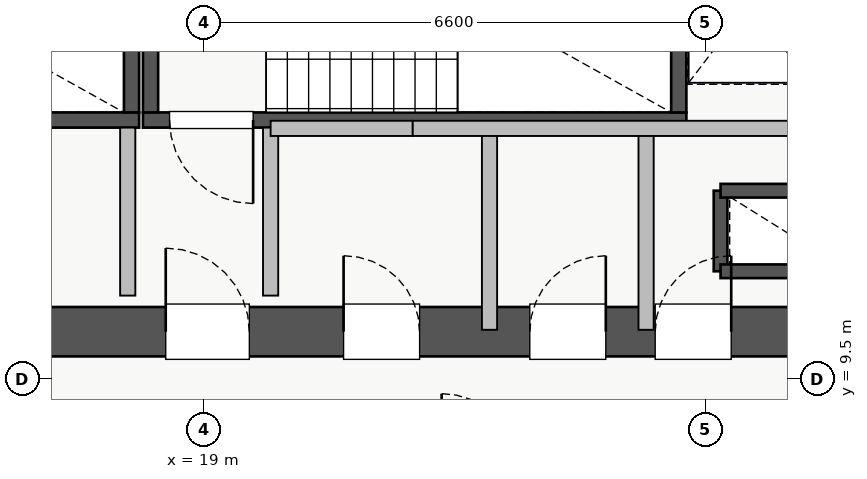
"""IFC4 building model, lengths in metres.
Left out: names, types, materials, properties, quantities, classifications, styles, units other than length and angle.
Written with IfcOpenShell. Run it as: python <this file> out.ifc"""

import sys

from ifc_helpers import new_model, si_unit, direction, frame, frame_2d, origin, place, context, subcontext, project, spatial, rectangle, extrude, source, transform, mapped, element, fill, save


model = new_model("IFC4")
c1 = context("Model", 3, precision=1e-05, world=origin(), true_north=direction((0.0, 1.0)))
c2 = subcontext(c1, "Body", "Model", "MODEL_VIEW")
j1 = project(units=[si_unit("LENGTHUNIT", "METRE"), si_unit("PLANEANGLEUNIT", "RADIAN")], contexts=[c1])
p1 = place(None, origin())
s1 = spatial("IfcSite", under=j1, at=p1, CompositionType="ELEMENT")
p2 = place(p1, origin())
s2 = spatial("IfcBuilding", under=s1, at=p2, CompositionType="ELEMENT")
p3 = place(p2, frame((0.0, 0.0, 179.5)))
s3 = spatial("IfcBuildingStorey", under=s2, at=p3, CompositionType="ELEMENT", Elevation=179.5)
p4 = place(p3, frame((25.8, 10.92, 0.0), z_axis=(0.0, 0.0, 1.0), x_axis=(0.0, 1.0, 0.0)))
e1 = element("IfcWall", 1, at=p4, inside=s3, PredefinedType="SHEAR", context=c2, shape_type="SweptSolid", body=[
    extrude(rectangle(XDim=1.06, YDim=0.18, at=frame_2d((0.53, 0.0))), origin(), (0.0, 0.0, 1.0), 3.07),
])
for number, where, z_axis, x_axis in (
    (2, (25.8, 11.98, 0.0), (0.0, 0.0, 1.0), (1.0, 0.0, 0.0)),
    (3, (25.8, 10.92, 0.0), (0.0, 0.0, 1.0), (1.0, 0.0, 0.0)),
):
    element("IfcWall", number, at=place(p3, frame(where, z_axis=z_axis, x_axis=x_axis)), inside=s3, PredefinedType="SHEAR", context=c2, shape_type="SweptSolid", body=[
        extrude(rectangle(XDim=1.35, YDim=0.18, at=frame_2d((0.675, 0.0))), origin(), (0.0, 0.0, 1.0), 3.07),
    ])
p5 = place(p3, frame((10.85, 12.91, 0.0), z_axis=(0.0, 0.0, 1.0), x_axis=(1.0, 0.0, 0.0)))
e4 = element("IfcWall", 4, at=p5, inside=s3, PredefinedType="SHEAR", context=c2, shape_type="SweptSolid", body=[
    extrude(rectangle(XDim=7.3, YDim=0.2, at=frame_2d((3.65, 0.0))), origin(), (0.0, 0.0, 1.0), 3.25),
])
p6 = place(p5, frame((0.35, 0.0, 0.0)))
e5 = element("IfcOpeningElement", 5, at=p6, cuts=e4, PredefinedType="OPENING", context=c2, shape_type="SweptSolid", body=[
    extrude(rectangle(XDim=1.1, YDim=2.05, at=frame_2d((0.55, 1.025))), frame((0.0, 0.11, 0.0), z_axis=(0.0, -1.0, 0.0), x_axis=(1.0, 0.0, 0.0)), (0.0, 0.0, 1.0), 0.22),
])
p7 = place(p3, frame((18.05, 13.01, 0.0), z_axis=(0.0, 0.0, 1.0), x_axis=(0.0, 1.0, 0.0)))
e6 = element("IfcWall", 6, at=p7, inside=s3, PredefinedType="SHEAR", context=c2, shape_type="SweptSolid", body=[
    extrude(rectangle(XDim=2.94, YDim=0.2, at=frame_2d((1.47, 0.0))), origin(), (0.0, 0.0, 1.0), 3.25),
])
p8 = place(p3, frame((18.2, 12.91, 0.0), z_axis=(0.0, 0.0, 1.0), x_axis=(1.0, 0.0, 0.0)))
e7 = element("IfcWall", 7, at=p8, inside=s3, PredefinedType="SHEAR", context=c2, shape_type="SweptSolid", body=[
    extrude(rectangle(XDim=7.15, YDim=0.2, at=frame_2d((3.575, 0.0))), origin(), (0.0, 0.0, 1.0), 3.25),
])
p9 = place(p8, frame((0.35, 0.0, 0.0)))
e8 = element("IfcOpeningElement", 8, at=p9, cuts=e7, PredefinedType="OPENING", context=c2, shape_type="SweptSolid", body=[
    extrude(rectangle(XDim=1.1, YDim=2.05, at=frame_2d((0.55, 1.025))), frame((0.0, 0.11, 0.0), z_axis=(0.0, -1.0, 0.0), x_axis=(1.0, 0.0, 0.0)), (0.0, 0.0, 1.0), 0.22),
])
for number, where, z_axis, x_axis in (
    (9, (18.3, 13.01, 0.0), (0.0, 0.0, 1.0), (0.0, 1.0, 0.0)),
    (10, (25.25, 13.01, 0.0), (0.0, 0.0, 1.0), (0.0, 1.0, 0.0)),
):
    element("IfcWall", number, at=place(p3, frame(where, z_axis=z_axis, x_axis=x_axis)), inside=s3, PredefinedType="SHEAR", context=c2, shape_type="SweptSolid", body=[
        extrude(rectangle(XDim=2.94, YDim=0.2, at=frame_2d((1.47, 0.0))), origin(), (0.0, 0.0, 1.0), 3.25),
    ])
p10 = place(p3, frame((10.2, 10.125, 0.0), z_axis=(0.0, 0.0, 1.0), x_axis=(1.0, 0.0, 0.0)))
e11 = element("IfcWall", 11, at=p10, inside=s3, PredefinedType="SHEAR", context=c2, shape_type="SweptSolid", body=[
    extrude(rectangle(XDim=17.6, YDim=0.65, at=frame_2d((8.8, 0.0))), origin(), (0.0, 0.0, 1.0), 3.25),
])
p11 = place(p10, frame((1.15, 0.0, 0.0)))
e12 = element("IfcOpeningElement", 12, at=p11, cuts=e11, PredefinedType="OPENING", context=c2, shape_type="SweptSolid", body=[
    extrude(rectangle(XDim=1.1, YDim=2.05, at=frame_2d((0.55, 1.025))), frame((0.0, 0.335, 0.0), z_axis=(0.0, -1.0, 0.0), x_axis=(1.0, 0.0, 0.0)), (0.0, 0.0, 1.0), 0.67),
])
p12 = place(p10, frame((8.3, 0.0, 0.0)))
e13 = element("IfcOpeningElement", 13, at=p12, cuts=e11, PredefinedType="OPENING", context=c2, shape_type="SweptSolid", body=[
    extrude(rectangle(XDim=1.1, YDim=2.05, at=frame_2d((0.55, 1.025))), frame((0.0, 0.335, 0.0), z_axis=(0.0, -1.0, 0.0), x_axis=(1.0, 0.0, 0.0)), (0.0, 0.0, 1.0), 0.67),
])
p13 = place(p10, frame((4.9, 0.0, 0.0)))
e14 = element("IfcOpeningElement", 14, at=p13, cuts=e11, PredefinedType="OPENING", context=c2, shape_type="SweptSolid", body=[
    extrude(rectangle(XDim=1.1, YDim=2.05, at=frame_2d((0.55, 1.025))), frame((0.0, 0.335, 0.0), z_axis=(0.0, -1.0, 0.0), x_axis=(1.0, 0.0, 0.0)), (0.0, 0.0, 1.0), 0.67),
])
p14 = place(p10, frame((14.74, 0.0, 0.0)))
e15 = element("IfcOpeningElement", 15, at=p14, cuts=e11, PredefinedType="OPENING", context=c2, shape_type="SweptSolid", body=[
    extrude(rectangle(XDim=1.0, YDim=2.05, at=frame_2d((0.5, 1.025))), frame((0.0, 0.335, 0.0), z_axis=(0.0, -1.0, 0.0), x_axis=(1.0, 0.0, 0.0)), (0.0, 0.0, 1.0), 0.67),
])
p15 = place(p10, frame((10.64, 0.0, 0.0)))
e16 = element("IfcOpeningElement", 16, at=p15, cuts=e11, PredefinedType="OPENING", context=c2, shape_type="SweptSolid", body=[
    extrude(rectangle(XDim=1.0, YDim=2.05, at=frame_2d((0.5, 1.025))), frame((0.0, 0.335, 0.0), z_axis=(0.0, -1.0, 0.0), x_axis=(1.0, 0.0, 0.0)), (0.0, 0.0, 1.0), 0.67),
])
p16 = place(p10, frame((13.09, 0.0, 0.0)))
e17 = element("IfcOpeningElement", 17, at=p16, cuts=e11, PredefinedType="OPENING", context=c2, shape_type="SweptSolid", body=[
    extrude(rectangle(XDim=1.0, YDim=2.05, at=frame_2d((0.5, 1.025))), frame((0.0, 0.335, 0.0), z_axis=(0.0, -1.0, 0.0), x_axis=(1.0, 0.0, 0.0)), (0.0, 0.0, 1.0), 0.67),
])
for number, where, z_axis, x_axis in (
    (18, (18.0, 10.6, 0.0), (0.0, 0.0, 1.0), (0.0, 1.0, 0.0)),
    (19, (19.88, 10.6, 0.0), (0.0, 0.0, 1.0), (0.0, 1.0, 0.0)),
):
    element("IfcWall", number, at=place(p3, frame(where, z_axis=z_axis, x_axis=x_axis)), inside=s3, PredefinedType="PARTITIONING", context=c2, shape_type="SweptSolid", body=[
        extrude(rectangle(XDim=2.21, YDim=0.2, at=frame_2d((1.105, 0.0))), origin(), (0.0, 0.0, 1.0), 3.07),
    ])
p17 = place(p3, frame((24.82, 10.15, 0.0), z_axis=(0.0, 0.0, 1.0), x_axis=(0.0, 1.0, 0.0)))
e20 = element("IfcWall", 20, at=p17, inside=s3, PredefinedType="PARTITIONING", context=c2, shape_type="SweptSolid", body=[
    extrude(rectangle(XDim=2.65, YDim=0.2, at=frame_2d((1.325, 0.0))), origin(), (0.0, 0.0, 1.0), 3.07),
])
p18 = place(p3, frame((19.88, 12.8, 0.0), z_axis=(0.0, 0.0, 1.0), x_axis=(1.0, 0.0, 0.0)))
e21 = element("IfcWall", 21, at=p18, inside=s3, PredefinedType="PARTITIONING", context=c2, shape_type="SweptSolid", body=[
    extrude(rectangle(XDim=1.87, YDim=0.2, at=frame_2d((0.935, 0.0))), origin(), (0.0, 0.0, 1.0), 3.07),
])
p19 = place(p3, frame((22.76, 10.15, 0.0), z_axis=(0.0, 0.0, 1.0), x_axis=(0.0, 1.0, 0.0)))
e22 = element("IfcWall", 22, at=p19, inside=s3, PredefinedType="PARTITIONING", context=c2, shape_type="SweptSolid", body=[
    extrude(rectangle(XDim=2.65, YDim=0.2, at=frame_2d((1.325, 0.0))), origin(), (0.0, 0.0, 1.0), 3.07),
])
p20 = place(p3, frame((21.75, 12.8, 0.0), z_axis=(0.0, 0.0, 1.0), x_axis=(1.0, 0.0, 0.0)))
e23 = element("IfcWall", 23, at=p20, inside=s3, PredefinedType="PARTITIONING", context=c2, shape_type="SweptSolid", body=[
    extrude(rectangle(XDim=5.17, YDim=0.2, at=frame_2d((2.585, 0.0))), origin(), (0.0, 0.0, 1.0), 3.07),
])
m1 = source(origin(), c2, "Body", "SweptSolid", [
    extrude(rectangle(XDim=1.1, YDim=2.05, at=frame_2d((0.55, 1.025))), frame((0.0, 0.025, 0.0), z_axis=(0.0, -1.0, 0.0), x_axis=(1.0, 0.0, 0.0)), (0.0, 0.0, 1.0), 0.05),
])
p21 = place(p12, origin())
e24 = element("IfcDoor", 24, at=p21, inside=s3, OperationType="SINGLE_SWING_LEFT", PredefinedType="DOOR", context=c2, shape_type="MappedRepresentation", body=[
    mapped(m1, transform((0.0, 0.0, 0.0), x_axis=(1.0, 0.0, 0.0), y_axis=(0.0, 1.0, 0.0), z_axis=(0.0, 0.0, 1.0), scale=1.0)),
])
fill(e13, e24)
p22 = place(p9, frame((1.1, 0.0, 0.0), z_axis=(0.0, 0.0, 1.0), x_axis=(-1.0, 0.0, 0.0)))
e25 = element("IfcDoor", 25, at=p22, inside=s3, OperationType="SINGLE_SWING_RIGHT", PredefinedType="DOOR", context=c2, shape_type="MappedRepresentation", body=[
    mapped(m1, transform((0.0, 0.0, 0.0), x_axis=(1.0, 0.0, 0.0), y_axis=(0.0, 1.0, 0.0), z_axis=(0.0, 0.0, 1.0), scale=1.0)),
])
fill(e8, e25)
m2 = source(origin(), c2, "Body", "SweptSolid", [
    extrude(rectangle(XDim=1.0, YDim=2.05, at=frame_2d((0.5, 1.025))), frame((0.0, 0.025, 0.0), z_axis=(0.0, -1.0, 0.0), x_axis=(1.0, 0.0, 0.0)), (0.0, 0.0, 1.0), 0.05),
])
p23 = place(p14, origin())
e26 = element("IfcDoor", 26, at=p23, inside=s3, OperationType="SINGLE_SWING_RIGHT", PredefinedType="DOOR", context=c2, shape_type="MappedRepresentation", body=[
    mapped(m2, transform((0.0, 0.0, 0.0), x_axis=(1.0, 0.0, 0.0), y_axis=(0.0, 1.0, 0.0), z_axis=(0.0, 0.0, 1.0), scale=1.0)),
])
fill(e15, e26)
p24 = place(p15, origin())
e27 = element("IfcDoor", 27, at=p24, inside=s3, OperationType="SINGLE_SWING_LEFT", PredefinedType="DOOR", context=c2, shape_type="MappedRepresentation", body=[
    mapped(m2, transform((0.0, 0.0, 0.0), x_axis=(1.0, 0.0, 0.0), y_axis=(0.0, 1.0, 0.0), z_axis=(0.0, 0.0, 1.0), scale=1.0)),
])
fill(e16, e27)
p25 = place(p16, origin())
e28 = element("IfcDoor", 28, at=p25, inside=s3, OperationType="SINGLE_SWING_RIGHT", PredefinedType="DOOR", context=c2, shape_type="MappedRepresentation", body=[
    mapped(m2, transform((0.0, 0.0, 0.0), x_axis=(1.0, 0.0, 0.0), y_axis=(0.0, 1.0, 0.0), z_axis=(0.0, 0.0, 1.0), scale=1.0)),
])
fill(e17, e28)
save(model, sys.argv[1])
